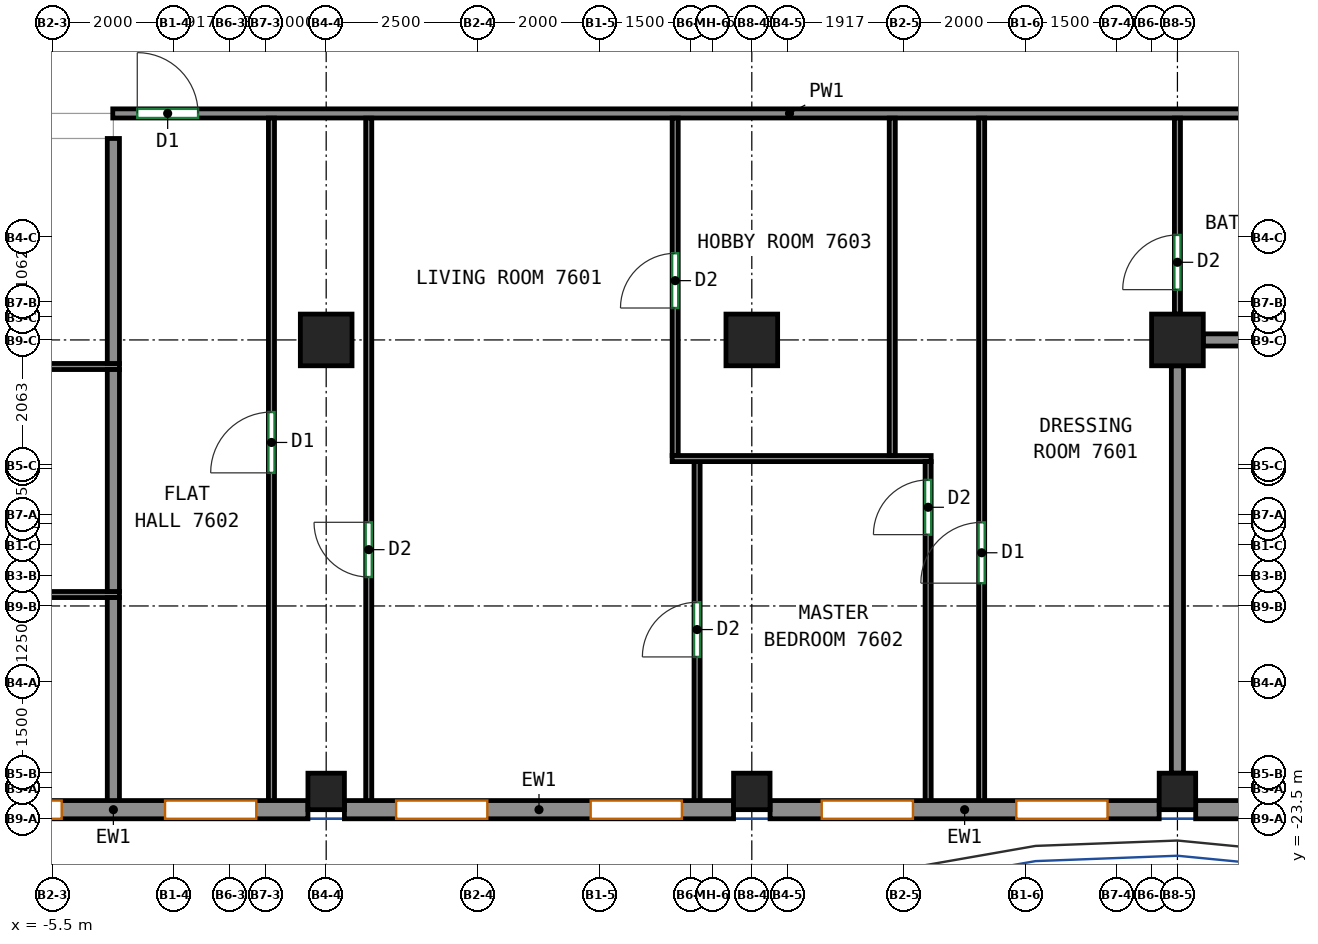
"""IFC4 building model, lengths in metres.
Left out: names, types, materials, properties, quantities, classifications, styles, units other than length and angle.
Written with IfcOpenShell. Run it as: python <this file> out.ifc"""

import sys

from ifc_helpers import new_model, si_unit, direction, frame, frame_2d, origin, origin_2d, place, context, subcontext, project, spatial, rectangle, extrude, source, transform, mapped, element, fill, save


model = new_model("IFC4")
c1 = context("Model", 3, precision=1e-05, world=origin(), true_north=direction((0.0, 1.0)))
c2 = subcontext(c1, "Body", "Model", "MODEL_VIEW")
j1 = project(units=[si_unit("LENGTHUNIT", "METRE"), si_unit("PLANEANGLEUNIT", "RADIAN")], contexts=[c1])
p1 = place(None, origin())
s1 = spatial("IfcSite", under=j1, at=p1, CompositionType="ELEMENT")
p2 = place(p1, origin())
s2 = spatial("IfcBuilding", under=s1, at=p2, CompositionType="ELEMENT")
p3 = place(p2, frame((0.0, 0.0, 305.2)))
s3 = spatial("IfcBuildingStorey", under=s2, at=p3, CompositionType="ELEMENT", Elevation=305.2)
m1 = source(origin(), c2, "Body", "SweptSolid", [
    extrude(rectangle(XDim=0.6, YDim=0.6, at=origin_2d()), origin(), (0.0, 0.0, 1.0), 3.12),
])
p4 = place(p3, frame((-1.0, -23.05, 0.0), z_axis=(0.0, 0.0, 1.0), x_axis=(1.0, 0.0, 0.0)))
e1 = element("IfcColumn", 1, at=p4, inside=s3, PredefinedType="COLUMN", context=c2, shape_type="MappedRepresentation", body=[
    mapped(m1, transform((0.0, 0.0, 0.0))),
])
m2 = source(origin(), c2, "Body", "SweptSolid", [
    extrude(rectangle(XDim=0.85, YDim=0.85, at=origin_2d()), origin(), (0.0, 0.0, 1.0), 3.12),
])
p5 = place(p3, frame((-1.0, -15.625, 0.0), z_axis=(0.0, 0.0, 1.0), x_axis=(1.0, 0.0, 0.0)))
e2 = element("IfcColumn", 2, at=p5, inside=s3, PredefinedType="COLUMN", context=c2, shape_type="MappedRepresentation", body=[
    mapped(m2, transform((0.0, 0.0, 0.0))),
])
p6 = place(p3, frame((6.0, -23.05, 0.0), z_axis=(0.0, 0.0, 1.0), x_axis=(1.0, 0.0, 0.0)))
e3 = element("IfcColumn", 3, at=p6, inside=s3, PredefinedType="COLUMN", context=c2, shape_type="MappedRepresentation", body=[
    mapped(m1, transform((0.0, 0.0, 0.0))),
])
p7 = place(p3, frame((6.0, -15.625, 0.0), z_axis=(0.0, 0.0, 1.0), x_axis=(1.0, 0.0, 0.0)))
e4 = element("IfcColumn", 4, at=p7, inside=s3, PredefinedType="COLUMN", context=c2, shape_type="MappedRepresentation", body=[
    mapped(m2, transform((0.0, 0.0, 0.0))),
])
p8 = place(p3, frame((13.0, -23.05, 0.0), z_axis=(0.0, 0.0, 1.0), x_axis=(1.0, 0.0, 0.0)))
e5 = element("IfcColumn", 5, at=p8, inside=s3, PredefinedType="COLUMN", context=c2, shape_type="MappedRepresentation", body=[
    mapped(m1, transform((0.0, 0.0, 0.0))),
])
p9 = place(p3, frame((13.0, -15.625, 0.0), z_axis=(0.0, 0.0, 1.0), x_axis=(1.0, 0.0, 0.0)))
e6 = element("IfcColumn", 6, at=p9, inside=s3, PredefinedType="COLUMN", context=c2, shape_type="MappedRepresentation", body=[
    mapped(m2, transform((0.0, 0.0, 0.0))),
])
m3 = source(origin(), c2, "Body", "SweptSolid", [
    extrude(rectangle(XDim=6.4, YDim=0.3, at=frame_2d((3.2, 0.0))), origin(), (0.0, 0.0, 1.0), 3.12),
])
p10 = place(p3, frame((-7.7, -23.35, 0.0), z_axis=(0.0, 0.0, 1.0), x_axis=(1.0, 0.0, 0.0)))
e7 = element("IfcWall", 7, at=p10, inside=s3, PredefinedType="SOLIDWALL", context=c2, shape_type="MappedRepresentation", body=[
    mapped(m3, transform((0.0, 0.0, 0.0))),
])
p11 = place(p10, frame((0.85, 0.0, 0.8)))
e8 = element("IfcOpeningElement", 8, at=p11, cuts=e7, PredefinedType="OPENING", context=c2, shape_type="SweptSolid", body=[
    extrude(rectangle(XDim=1.5, YDim=2.05, at=frame_2d((0.75, 1.025))), frame((0.0, 0.16, 0.0), z_axis=(0.0, -1.0, 0.0), x_axis=(1.0, 0.0, 0.0)), (0.0, 0.0, 1.0), 0.32),
])
p12 = place(p10, frame((4.05, 0.0, 0.8)))
e9 = element("IfcOpeningElement", 9, at=p12, cuts=e7, PredefinedType="OPENING", context=c2, shape_type="SweptSolid", body=[
    extrude(rectangle(XDim=1.5, YDim=2.05, at=frame_2d((0.75, 1.025))), frame((0.0, 0.16, 0.0), z_axis=(0.0, -1.0, 0.0), x_axis=(1.0, 0.0, 0.0)), (0.0, 0.0, 1.0), 0.32),
])
p13 = place(p3, frame((-0.7, -23.35, 0.0), z_axis=(0.0, 0.0, 1.0), x_axis=(1.0, 0.0, 0.0)))
e10 = element("IfcWall", 10, at=p13, inside=s3, PredefinedType="SOLIDWALL", context=c2, shape_type="MappedRepresentation", body=[
    mapped(m3, transform((0.0, 0.0, 0.0))),
])
p14 = place(p13, frame((0.85, 0.0, 0.8)))
e11 = element("IfcOpeningElement", 11, at=p14, cuts=e10, PredefinedType="OPENING", context=c2, shape_type="SweptSolid", body=[
    extrude(rectangle(XDim=1.5, YDim=2.05, at=frame_2d((0.75, 1.025))), frame((0.0, 0.16, 0.0), z_axis=(0.0, -1.0, 0.0), x_axis=(1.0, 0.0, 0.0)), (0.0, 0.0, 1.0), 0.32),
])
p15 = place(p13, frame((4.05, 0.0, 0.8)))
e12 = element("IfcOpeningElement", 12, at=p15, cuts=e10, PredefinedType="OPENING", context=c2, shape_type="SweptSolid", body=[
    extrude(rectangle(XDim=1.5, YDim=2.05, at=frame_2d((0.75, 1.025))), frame((0.0, 0.16, 0.0), z_axis=(0.0, -1.0, 0.0), x_axis=(1.0, 0.0, 0.0)), (0.0, 0.0, 1.0), 0.32),
])
p16 = place(p3, frame((6.3, -23.35, 0.0), z_axis=(0.0, 0.0, 1.0), x_axis=(1.0, 0.0, 0.0)))
e13 = element("IfcWall", 13, at=p16, inside=s3, PredefinedType="SOLIDWALL", context=c2, shape_type="MappedRepresentation", body=[
    mapped(m3, transform((0.0, 0.0, 0.0))),
])
p17 = place(p16, frame((0.85, 0.0, 0.8)))
e14 = element("IfcOpeningElement", 14, at=p17, cuts=e13, PredefinedType="OPENING", context=c2, shape_type="SweptSolid", body=[
    extrude(rectangle(XDim=1.5, YDim=2.05, at=frame_2d((0.75, 1.025))), frame((0.0, 0.16, 0.0), z_axis=(0.0, -1.0, 0.0), x_axis=(1.0, 0.0, 0.0)), (0.0, 0.0, 1.0), 0.32),
])
p18 = place(p16, frame((4.05, 0.0, 0.8)))
e15 = element("IfcOpeningElement", 15, at=p18, cuts=e13, PredefinedType="OPENING", context=c2, shape_type="SweptSolid", body=[
    extrude(rectangle(XDim=1.5, YDim=2.05, at=frame_2d((0.75, 1.025))), frame((0.0, 0.16, 0.0), z_axis=(0.0, -1.0, 0.0), x_axis=(1.0, 0.0, 0.0)), (0.0, 0.0, 1.0), 0.32),
])
p19 = place(p3, frame((13.3, -23.35, 0.0), z_axis=(0.0, 0.0, 1.0), x_axis=(1.0, 0.0, 0.0)))
e16 = element("IfcWall", 16, at=p19, inside=s3, PredefinedType="SOLIDWALL", context=c2, shape_type="MappedRepresentation", body=[
    mapped(m3, transform((0.0, 0.0, 0.0))),
])
p20 = place(p19, frame((0.85, 0.0, 0.8)))
e17 = element("IfcOpeningElement", 17, at=p20, cuts=e16, PredefinedType="OPENING", context=c2, shape_type="SweptSolid", body=[
    extrude(rectangle(XDim=1.5, YDim=2.05, at=frame_2d((0.75, 1.025))), frame((0.0, 0.16, 0.0), z_axis=(0.0, -1.0, 0.0), x_axis=(1.0, 0.0, 0.0)), (0.0, 0.0, 1.0), 0.32),
])
p21 = place(p19, frame((4.05, 0.0, 0.8)))
e18 = element("IfcOpeningElement", 18, at=p21, cuts=e16, PredefinedType="OPENING", context=c2, shape_type="SweptSolid", body=[
    extrude(rectangle(XDim=1.5, YDim=2.05, at=frame_2d((0.75, 1.025))), frame((0.0, 0.16, 0.0), z_axis=(0.0, -1.0, 0.0), x_axis=(1.0, 0.0, 0.0)), (0.0, 0.0, 1.0), 0.32),
])
p22 = place(p3, frame((-4.51, -11.9, 0.0), z_axis=(0.0, 0.0, 1.0), x_axis=(1.0, 0.0, 0.0)))
e19 = element("IfcWall", 19, at=p22, inside=s3, PredefinedType="PARTITIONING", context=c2, shape_type="SweptSolid", body=[
    extrude(rectangle(XDim=22.26, YDim=0.15, at=frame_2d((11.13, 0.0))), origin(), (0.0, 0.0, 1.0), 3.12),
])
p23 = place(p22, frame((0.403, 0.0, 0.0)))
e20 = element("IfcOpeningElement", 20, at=p23, cuts=e19, PredefinedType="OPENING", context=c2, shape_type="SweptSolid", body=[
    extrude(rectangle(XDim=1.0, YDim=2.1, at=frame_2d((0.5, 1.05))), frame((0.0, 0.085, 0.0), z_axis=(0.0, -1.0, 0.0), x_axis=(1.0, 0.0, 0.0)), (0.0, 0.0, 1.0), 0.17),
])
p24 = place(p3, frame((-24.75, -19.812, 0.0), z_axis=(0.0, 0.0, 1.0), x_axis=(1.0, 0.0, 0.0)))
e21 = element("IfcWall", 21, at=p24, inside=s3, PredefinedType="PARTITIONING", context=c2, shape_type="SweptSolid", body=[
    extrude(rectangle(XDim=20.35, YDim=0.1, at=frame_2d((10.175, 0.0))), origin(), (0.0, 0.0, 1.0), 3.12),
])
p25 = place(p24, frame((2.624, 0.0, 0.0)))
e22 = element("IfcOpeningElement", 22, at=p25, cuts=e21, PredefinedType="OPENING", context=c2, shape_type="SweptSolid", body=[
    extrude(rectangle(XDim=0.9, YDim=2.1, at=frame_2d((0.45, 1.05))), frame((0.0, 0.06, 0.0), z_axis=(0.0, -1.0, 0.0), x_axis=(1.0, 0.0, 0.0)), (0.0, 0.0, 1.0), 0.12),
])
p26 = place(p3, frame((-4.5, -23.25, 0.0), z_axis=(0.0, 0.0, 1.0), x_axis=(0.0, 1.0, 0.0)))
e23 = element("IfcWall", 23, at=p26, inside=s3, PredefinedType="PARTITIONING", context=c2, shape_type="SweptSolid", body=[
    extrude(rectangle(XDim=3.388, YDim=0.2, at=frame_2d((1.694, 0.0))), origin(), (0.0, 0.0, 1.0), 3.12),
])
p27 = place(p3, frame((-7.575, -16.062, 0.0), z_axis=(0.0, 0.0, 1.0), x_axis=(1.0, 0.0, 0.0)))
e24 = element("IfcWall", 24, at=p27, inside=s3, PredefinedType="PARTITIONING", context=c2, shape_type="SweptSolid", body=[
    extrude(rectangle(XDim=3.175, YDim=0.1, at=frame_2d((1.587, 0.0))), origin(), (0.0, 0.0, 1.0), 3.12),
])
p28 = place(p3, frame((-4.5, -19.762, 0.0), z_axis=(0.0, 0.0, 1.0), x_axis=(0.0, 1.0, 0.0)))
e25 = element("IfcWall", 25, at=p28, inside=s3, PredefinedType="PARTITIONING", context=c2, shape_type="SweptSolid", body=[
    extrude(rectangle(XDim=3.65, YDim=0.2, at=frame_2d((1.825, 0.0))), origin(), (0.0, 0.0, 1.0), 3.12),
])
p29 = place(p3, frame((-4.5, -16.012, 0.0), z_axis=(0.0, 0.0, 1.0), x_axis=(0.0, 1.0, 0.0)))
e26 = element("IfcWall", 26, at=p29, inside=s3, PredefinedType="PARTITIONING", context=c2, shape_type="SweptSolid", body=[
    extrude(rectangle(XDim=3.7, YDim=0.2, at=frame_2d((1.85, 0.0))), origin(), (0.0, 0.0, 1.0), 3.12),
])
p30 = place(p3, frame((-1.9, -23.25, 0.0), z_axis=(0.0, 0.0, 1.0), x_axis=(0.0, 1.0, 0.0)))
e27 = element("IfcWall", 27, at=p30, inside=s3, PredefinedType="PARTITIONING", context=c2, shape_type="SweptSolid", body=[
    extrude(rectangle(XDim=11.273, YDim=0.1, at=frame_2d((5.636, 0.0))), origin(), (0.0, 0.0, 1.0), 3.12),
])
p31 = place(p30, frame((5.439, 0.0, 0.0)))
e28 = element("IfcOpeningElement", 28, at=p31, cuts=e27, PredefinedType="OPENING", context=c2, shape_type="SweptSolid", body=[
    extrude(rectangle(XDim=1.0, YDim=2.1, at=frame_2d((0.5, 1.05))), frame((0.0, 0.06, 0.0), z_axis=(0.0, -1.0, 0.0), x_axis=(1.0, 0.0, 0.0)), (0.0, 0.0, 1.0), 0.12),
])
p32 = place(p3, frame((-0.3, -23.25, 0.0), z_axis=(0.0, 0.0, 1.0), x_axis=(0.0, 1.0, 0.0)))
e29 = element("IfcWall", 29, at=p32, inside=s3, PredefinedType="PARTITIONING", context=c2, shape_type="SweptSolid", body=[
    extrude(rectangle(XDim=11.273, YDim=0.1, at=frame_2d((5.636, 0.0))), origin(), (0.0, 0.0, 1.0), 3.12),
])
p33 = place(p32, frame((3.726, 0.0, 0.0)))
e30 = element("IfcOpeningElement", 30, at=p33, cuts=e29, PredefinedType="OPENING", context=c2, shape_type="SweptSolid", body=[
    extrude(rectangle(XDim=0.9, YDim=2.1, at=frame_2d((0.45, 1.05))), frame((0.0, 0.06, 0.0), z_axis=(0.0, -1.0, 0.0), x_axis=(1.0, 0.0, 0.0)), (0.0, 0.0, 1.0), 0.12),
])
p34 = place(p3, frame((5.1, -23.25, 0.0), z_axis=(0.0, 0.0, 1.0), x_axis=(0.0, 1.0, 0.0)))
e31 = element("IfcWall", 31, at=p34, inside=s3, PredefinedType="PARTITIONING", context=c2, shape_type="SweptSolid", body=[
    extrude(rectangle(XDim=5.624, YDim=0.1, at=frame_2d((2.812, 0.0))), origin(), (0.0, 0.0, 1.0), 3.12),
])
p35 = place(p34, frame((2.412, 0.0, 0.0)))
e32 = element("IfcOpeningElement", 32, at=p35, cuts=e31, PredefinedType="OPENING", context=c2, shape_type="SweptSolid", body=[
    extrude(rectangle(XDim=0.9, YDim=2.1, at=frame_2d((0.45, 1.05))), frame((0.0, 0.06, 0.0), z_axis=(0.0, -1.0, 0.0), x_axis=(1.0, 0.0, 0.0)), (0.0, 0.0, 1.0), 0.12),
])
p36 = place(p3, frame((4.74, -17.526, 0.0), z_axis=(0.0, 0.0, 1.0), x_axis=(0.0, 1.0, 0.0)))
e33 = element("IfcWall", 33, at=p36, inside=s3, PredefinedType="PARTITIONING", context=c2, shape_type="SweptSolid", body=[
    extrude(rectangle(XDim=5.549, YDim=0.1, at=frame_2d((2.774, 0.0))), origin(), (0.0, 0.0, 1.0), 3.12),
])
p37 = place(p36, frame((2.426, 0.0, 0.0)))
e34 = element("IfcOpeningElement", 34, at=p37, cuts=e33, PredefinedType="OPENING", context=c2, shape_type="SweptSolid", body=[
    extrude(rectangle(XDim=0.9, YDim=2.1, at=frame_2d((0.45, 1.05))), frame((0.0, 0.06, 0.0), z_axis=(0.0, -1.0, 0.0), x_axis=(1.0, 0.0, 0.0)), (0.0, 0.0, 1.0), 0.12),
])
p38 = place(p3, frame((4.69, -17.576, 0.0), z_axis=(0.0, 0.0, 1.0), x_axis=(1.0, 0.0, 0.0)))
e35 = element("IfcWall", 35, at=p38, inside=s3, PredefinedType="PARTITIONING", context=c2, shape_type="SweptSolid", body=[
    extrude(rectangle(XDim=4.26, YDim=0.1, at=frame_2d((2.13, 0.0))), origin(), (0.0, 0.0, 1.0), 3.12),
])
p39 = place(p3, frame((8.9, -23.25, 0.0), z_axis=(0.0, 0.0, 1.0), x_axis=(0.0, 1.0, 0.0)))
e36 = element("IfcWall", 36, at=p39, inside=s3, PredefinedType="PARTITIONING", context=c2, shape_type="SweptSolid", body=[
    extrude(rectangle(XDim=5.624, YDim=0.1, at=frame_2d((2.812, 0.0))), origin(), (0.0, 0.0, 1.0), 3.12),
])
p40 = place(p39, frame((4.423, 0.0, 0.0)))
e37 = element("IfcOpeningElement", 37, at=p40, cuts=e36, PredefinedType="OPENING", context=c2, shape_type="SweptSolid", body=[
    extrude(rectangle(XDim=0.9, YDim=2.1, at=frame_2d((0.45, 1.05))), frame((0.0, 0.06, 0.0), z_axis=(0.0, -1.0, 0.0), x_axis=(1.0, 0.0, 0.0)), (0.0, 0.0, 1.0), 0.12),
])
p41 = place(p3, frame((8.31, -17.526, 0.0), z_axis=(0.0, 0.0, 1.0), x_axis=(0.0, 1.0, 0.0)))
e38 = element("IfcWall", 38, at=p41, inside=s3, PredefinedType="PARTITIONING", context=c2, shape_type="SweptSolid", body=[
    extrude(rectangle(XDim=5.549, YDim=0.1, at=frame_2d((2.774, 0.0))), origin(), (0.0, 0.0, 1.0), 3.12),
])
p42 = place(p3, frame((9.78, -23.25, 0.0), z_axis=(0.0, 0.0, 1.0), x_axis=(0.0, 1.0, 0.0)))
e39 = element("IfcWall", 39, at=p42, inside=s3, PredefinedType="PARTITIONING", context=c2, shape_type="SweptSolid", body=[
    extrude(rectangle(XDim=11.273, YDim=0.1, at=frame_2d((5.636, 0.0))), origin(), (0.0, 0.0, 1.0), 3.12),
])
p43 = place(p42, frame((3.625, 0.0, 0.0)))
e40 = element("IfcOpeningElement", 40, at=p43, cuts=e39, PredefinedType="OPENING", context=c2, shape_type="SweptSolid", body=[
    extrude(rectangle(XDim=1.0, YDim=2.1, at=frame_2d((0.5, 1.05))), frame((0.0, 0.06, 0.0), z_axis=(0.0, -1.0, 0.0), x_axis=(1.0, 0.0, 0.0)), (0.0, 0.0, 1.0), 0.12),
])
p44 = place(p3, frame((13.0, -15.2, 0.0), z_axis=(0.0, 0.0, 1.0), x_axis=(0.0, 1.0, 0.0)))
e41 = element("IfcWall", 41, at=p44, inside=s3, PredefinedType="PARTITIONING", context=c2, shape_type="SweptSolid", body=[
    extrude(rectangle(XDim=3.223, YDim=0.1, at=frame_2d((1.611, 0.0))), origin(), (0.0, 0.0, 1.0), 3.12),
])
p45 = place(p44, frame((0.402, 0.0, 0.0)))
e42 = element("IfcOpeningElement", 42, at=p45, cuts=e41, PredefinedType="OPENING", context=c2, shape_type="SweptSolid", body=[
    extrude(rectangle(XDim=0.9, YDim=2.1, at=frame_2d((0.45, 1.05))), frame((0.0, 0.06, 0.0), z_axis=(0.0, -1.0, 0.0), x_axis=(1.0, 0.0, 0.0)), (0.0, 0.0, 1.0), 0.12),
])
p46 = place(p3, frame((13.0, -22.75, 0.0), z_axis=(0.0, 0.0, 1.0), x_axis=(0.0, 1.0, 0.0)))
e43 = element("IfcWall", 43, at=p46, inside=s3, PredefinedType="PARTITIONING", context=c2, shape_type="SweptSolid", body=[
    extrude(rectangle(XDim=6.7, YDim=0.2, at=frame_2d((3.35, 0.0))), origin(), (0.0, 0.0, 1.0), 3.12),
])
p47 = place(p3, frame((13.425, -15.625, 0.0), z_axis=(0.0, 0.0, 1.0), x_axis=(1.0, 0.0, 0.0)))
e44 = element("IfcWall", 44, at=p47, inside=s3, PredefinedType="PARTITIONING", context=c2, shape_type="SweptSolid", body=[
    extrude(rectangle(XDim=3.175, YDim=0.2, at=frame_2d((1.587, 0.0))), origin(), (0.0, 0.0, 1.0), 3.12),
])
p48 = place(p11, origin())
e45 = element("IfcWindow", 45, at=p48, inside=s3, PartitioningType="SINGLE_PANEL", PredefinedType="WINDOW", context=c2, shape_type="SweptSolid", body=[
    extrude(rectangle(XDim=1.5, YDim=2.05, at=frame_2d((0.75, 1.025))), frame((0.0, 0.03, 0.0), z_axis=(0.0, -1.0, 0.0), x_axis=(1.0, 0.0, 0.0)), (0.0, 0.0, 1.0), 0.06),
])
fill(e8, e45)
p49 = place(p12, origin())
e46 = element("IfcWindow", 46, at=p49, inside=s3, PartitioningType="SINGLE_PANEL", PredefinedType="WINDOW", context=c2, shape_type="SweptSolid", body=[
    extrude(rectangle(XDim=1.5, YDim=2.05, at=frame_2d((0.75, 1.025))), frame((0.0, 0.03, 0.0), z_axis=(0.0, -1.0, 0.0), x_axis=(1.0, 0.0, 0.0)), (0.0, 0.0, 1.0), 0.06),
])
fill(e9, e46)
p50 = place(p14, origin())
e47 = element("IfcWindow", 47, at=p50, inside=s3, PartitioningType="SINGLE_PANEL", PredefinedType="WINDOW", context=c2, shape_type="SweptSolid", body=[
    extrude(rectangle(XDim=1.5, YDim=2.05, at=frame_2d((0.75, 1.025))), frame((0.0, 0.03, 0.0), z_axis=(0.0, -1.0, 0.0), x_axis=(1.0, 0.0, 0.0)), (0.0, 0.0, 1.0), 0.06),
])
fill(e11, e47)
p51 = place(p15, origin())
e48 = element("IfcWindow", 48, at=p51, inside=s3, PartitioningType="SINGLE_PANEL", PredefinedType="WINDOW", context=c2, shape_type="SweptSolid", body=[
    extrude(rectangle(XDim=1.5, YDim=2.05, at=frame_2d((0.75, 1.025))), frame((0.0, 0.03, 0.0), z_axis=(0.0, -1.0, 0.0), x_axis=(1.0, 0.0, 0.0)), (0.0, 0.0, 1.0), 0.06),
])
fill(e12, e48)
p52 = place(p17, origin())
e49 = element("IfcWindow", 49, at=p52, inside=s3, PartitioningType="SINGLE_PANEL", PredefinedType="WINDOW", context=c2, shape_type="SweptSolid", body=[
    extrude(rectangle(XDim=1.5, YDim=2.05, at=frame_2d((0.75, 1.025))), frame((0.0, 0.03, 0.0), z_axis=(0.0, -1.0, 0.0), x_axis=(1.0, 0.0, 0.0)), (0.0, 0.0, 1.0), 0.06),
])
fill(e14, e49)
p53 = place(p18, origin())
e50 = element("IfcWindow", 50, at=p53, inside=s3, PartitioningType="SINGLE_PANEL", PredefinedType="WINDOW", context=c2, shape_type="SweptSolid", body=[
    extrude(rectangle(XDim=1.5, YDim=2.05, at=frame_2d((0.75, 1.025))), frame((0.0, 0.03, 0.0), z_axis=(0.0, -1.0, 0.0), x_axis=(1.0, 0.0, 0.0)), (0.0, 0.0, 1.0), 0.06),
])
fill(e15, e50)
p54 = place(p35, origin())
e51 = element("IfcDoor", 51, at=p54, inside=s3, OperationType="SINGLE_SWING_LEFT", PredefinedType="DOOR", context=c2, shape_type="SweptSolid", body=[
    extrude(rectangle(XDim=0.9, YDim=2.1, at=frame_2d((0.45, 1.05))), frame((0.0, 0.025, 0.0), z_axis=(0.0, -1.0, 0.0), x_axis=(1.0, 0.0, 0.0)), (0.0, 0.0, 1.0), 0.05),
])
fill(e32, e51)
p55 = place(p43, origin())
e52 = element("IfcDoor", 52, at=p55, inside=s3, OperationType="SINGLE_SWING_LEFT", PredefinedType="DOOR", context=c2, shape_type="SweptSolid", body=[
    extrude(rectangle(XDim=1.0, YDim=2.1, at=frame_2d((0.5, 1.05))), frame((0.0, 0.025, 0.0), z_axis=(0.0, -1.0, 0.0), x_axis=(1.0, 0.0, 0.0)), (0.0, 0.0, 1.0), 0.05),
])
fill(e40, e52)
p56 = place(p33, origin())
e53 = element("IfcDoor", 53, at=p56, inside=s3, OperationType="SINGLE_SWING_RIGHT", PredefinedType="DOOR", context=c2, shape_type="SweptSolid", body=[
    extrude(rectangle(XDim=0.9, YDim=2.1, at=frame_2d((0.45, 1.05))), frame((0.0, 0.025, 0.0), z_axis=(0.0, -1.0, 0.0), x_axis=(1.0, 0.0, 0.0)), (0.0, 0.0, 1.0), 0.05),
])
fill(e30, e53)
p57 = place(p40, origin())
e54 = element("IfcDoor", 54, at=p57, inside=s3, OperationType="SINGLE_SWING_LEFT", PredefinedType="DOOR", context=c2, shape_type="SweptSolid", body=[
    extrude(rectangle(XDim=0.9, YDim=2.1, at=frame_2d((0.45, 1.05))), frame((0.0, 0.025, 0.0), z_axis=(0.0, -1.0, 0.0), x_axis=(1.0, 0.0, 0.0)), (0.0, 0.0, 1.0), 0.05),
])
fill(e37, e54)
p58 = place(p31, origin())
e55 = element("IfcDoor", 55, at=p58, inside=s3, OperationType="SINGLE_SWING_LEFT", PredefinedType="DOOR", context=c2, shape_type="SweptSolid", body=[
    extrude(rectangle(XDim=1.0, YDim=2.1, at=frame_2d((0.5, 1.05))), frame((0.0, 0.025, 0.0), z_axis=(0.0, -1.0, 0.0), x_axis=(1.0, 0.0, 0.0)), (0.0, 0.0, 1.0), 0.05),
])
fill(e28, e55)
p59 = place(p37, origin())
e56 = element("IfcDoor", 56, at=p59, inside=s3, OperationType="SINGLE_SWING_LEFT", PredefinedType="DOOR", context=c2, shape_type="SweptSolid", body=[
    extrude(rectangle(XDim=0.9, YDim=2.1, at=frame_2d((0.45, 1.05))), frame((0.0, 0.025, 0.0), z_axis=(0.0, -1.0, 0.0), x_axis=(1.0, 0.0, 0.0)), (0.0, 0.0, 1.0), 0.05),
])
fill(e34, e56)
p60 = place(p45, origin())
e57 = element("IfcDoor", 57, at=p60, inside=s3, OperationType="SINGLE_SWING_LEFT", PredefinedType="DOOR", context=c2, shape_type="SweptSolid", body=[
    extrude(rectangle(XDim=0.9, YDim=2.1, at=frame_2d((0.45, 1.05))), frame((0.0, 0.025, 0.0), z_axis=(0.0, -1.0, 0.0), x_axis=(1.0, 0.0, 0.0)), (0.0, 0.0, 1.0), 0.05),
])
fill(e42, e57)
p61 = place(p23, origin())
e58 = element("IfcDoor", 58, at=p61, inside=s3, OperationType="SINGLE_SWING_LEFT", PredefinedType="DOOR", context=c2, shape_type="SweptSolid", body=[
    extrude(rectangle(XDim=1.0, YDim=2.1, at=frame_2d((0.5, 1.05))), frame((0.0, 0.025, 0.0), z_axis=(0.0, -1.0, 0.0), x_axis=(1.0, 0.0, 0.0)), (0.0, 0.0, 1.0), 0.05),
])
fill(e20, e58)
save(model, sys.argv[1])
